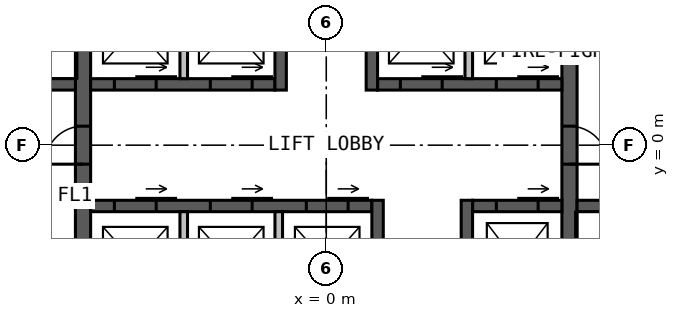
"""IFC4 building model, lengths in metres.
Left out: names, types, materials, properties, quantities, classifications, styles, units other than length and angle.
Written with IfcOpenShell. Run it as: python <this file> out.ifc"""

import sys

from ifc_helpers import new_model, si_unit, direction, frame, frame_2d, origin, place, context, subcontext, project, spatial, rectangle, extrude, element, fill, save


model = new_model("IFC4")
c1 = context("Model", 3, precision=1e-05, world=origin(), true_north=direction((0.0, 1.0)))
c2 = subcontext(c1, "Body", "Model", "MODEL_VIEW")
j1 = project(units=[si_unit("LENGTHUNIT", "METRE"), si_unit("PLANEANGLEUNIT", "RADIAN")], contexts=[c1])
p1 = place(None, origin())
s1 = spatial("IfcSite", under=j1, at=p1, CompositionType="ELEMENT")
p2 = place(p1, origin())
s2 = spatial("IfcBuilding", under=s1, at=p2, CompositionType="ELEMENT")
p3 = place(p2, frame((0.0, 0.0, 155.0)))
s3 = spatial("IfcBuildingStorey", under=s2, at=p3, CompositionType="ELEMENT", Elevation=155.0)
p4 = place(p3, frame((-6.4, -9.55, 0.0), z_axis=(0.0, 0.0, 1.0), x_axis=(0.0, 1.0, 0.0)))
e1 = element("IfcWall", 1, at=p4, inside=s3, PredefinedType="SOLIDWALL", context=c2, shape_type="SweptSolid", body=[
    extrude(rectangle(XDim=19.1, YDim=0.4, at=frame_2d((9.55, 0.0))), origin(), (0.0, 0.0, 1.0), 4.0),
])
p5 = place(p4, frame((9.05, 0.0, 0.0)))
e2 = element("IfcOpeningElement", 2, at=p5, cuts=e1, PredefinedType="OPENING", context=c2, shape_type="SweptSolid", body=[
    extrude(rectangle(XDim=1.0, YDim=2.2, at=frame_2d((0.5, 1.1))), frame((0.0, 0.21, 0.0), z_axis=(0.0, -1.0, 0.0), x_axis=(1.0, 0.0, 0.0)), (0.0, 0.0, 1.0), 0.42),
])
p6 = place(p3, frame((6.4, 9.55, 0.0), z_axis=(0.0, 0.0, 1.0), x_axis=(0.0, -1.0, 0.0)))
e3 = element("IfcWall", 3, at=p6, inside=s3, PredefinedType="SOLIDWALL", context=c2, shape_type="SweptSolid", body=[
    extrude(rectangle(XDim=19.1, YDim=0.4, at=frame_2d((9.55, 0.0))), origin(), (0.0, 0.0, 1.0), 4.0),
])
p7 = place(p6, frame((9.05, 0.0, 0.0)))
e4 = element("IfcOpeningElement", 4, at=p7, cuts=e3, PredefinedType="OPENING", context=c2, shape_type="SweptSolid", body=[
    extrude(rectangle(XDim=1.0, YDim=2.2, at=frame_2d((0.5, 1.1))), frame((0.0, 0.21, 0.0), z_axis=(0.0, -1.0, 0.0), x_axis=(1.0, 0.0, 0.0)), (0.0, 0.0, 1.0), 0.42),
])
p8 = place(p3, frame((-6.2, 1.6, 0.0), z_axis=(0.0, 0.0, 1.0), x_axis=(1.0, 0.0, 0.0)))
e5 = element("IfcWall", 5, at=p8, inside=s3, PredefinedType="SOLIDWALL", context=c2, shape_type="SweptSolid", body=[
    extrude(rectangle(XDim=4.85, YDim=0.3, at=frame_2d((2.425, 0.0))), origin(), (0.0, 0.0, 1.0), 4.0),
])
p9 = place(p8, frame((0.625, 0.0, 0.0)))
e6 = element("IfcOpeningElement", 6, at=p9, cuts=e5, PredefinedType="OPENING", context=c2, shape_type="SweptSolid", body=[
    extrude(rectangle(XDim=1.1, YDim=2.2, at=frame_2d((0.55, 1.1))), frame((0.0, 0.16, 0.0), z_axis=(0.0, -1.0, 0.0), x_axis=(1.0, 0.0, 0.0)), (0.0, 0.0, 1.0), 0.32),
])
p10 = place(p8, frame((3.15, 0.0, 0.0)))
e7 = element("IfcOpeningElement", 7, at=p10, cuts=e5, PredefinedType="OPENING", context=c2, shape_type="SweptSolid", body=[
    extrude(rectangle(XDim=1.1, YDim=2.2, at=frame_2d((0.55, 1.1))), frame((0.0, 0.16, 0.0), z_axis=(0.0, -1.0, 0.0), x_axis=(1.0, 0.0, 0.0)), (0.0, 0.0, 1.0), 0.32),
])
p11 = place(p3, frame((1.35, 1.6, 0.0), z_axis=(0.0, 0.0, 1.0), x_axis=(1.0, 0.0, 0.0)))
e8 = element("IfcWall", 8, at=p11, inside=s3, PredefinedType="SOLIDWALL", context=c2, shape_type="SweptSolid", body=[
    extrude(rectangle(XDim=4.85, YDim=0.3, at=frame_2d((2.425, 0.0))), origin(), (0.0, 0.0, 1.0), 4.0),
])
p12 = place(p11, frame((0.6, 0.0, 0.0)))
e9 = element("IfcOpeningElement", 9, at=p12, cuts=e8, PredefinedType="OPENING", context=c2, shape_type="SweptSolid", body=[
    extrude(rectangle(XDim=1.1, YDim=2.2, at=frame_2d((0.55, 1.1))), frame((0.0, 0.16, 0.0), z_axis=(0.0, -1.0, 0.0), x_axis=(1.0, 0.0, 0.0)), (0.0, 0.0, 1.0), 0.32),
])
p13 = place(p11, frame((3.125, 0.0, 0.0)))
e10 = element("IfcOpeningElement", 10, at=p13, cuts=e8, PredefinedType="OPENING", context=c2, shape_type="SweptSolid", body=[
    extrude(rectangle(XDim=1.1, YDim=2.2, at=frame_2d((0.55, 1.1))), frame((0.0, 0.16, 0.0), z_axis=(0.0, -1.0, 0.0), x_axis=(1.0, 0.0, 0.0)), (0.0, 0.0, 1.0), 0.32),
])
p14 = place(p3, frame((-1.2, 1.45, 0.0), z_axis=(0.0, 0.0, 1.0), x_axis=(0.0, 1.0, 0.0)))
e11 = element("IfcWall", 11, at=p14, inside=s3, PredefinedType="SOLIDWALL", context=c2, shape_type="SweptSolid", body=[
    extrude(rectangle(XDim=8.1, YDim=0.3, at=frame_2d((4.05, 0.0))), origin(), (0.0, 0.0, 1.0), 4.0),
])
p15 = place(p14, frame((5.05, 0.0, 0.0)))
e12 = element("IfcOpeningElement", 12, at=p15, cuts=e11, PredefinedType="OPENING", context=c2, shape_type="SweptSolid", body=[
    extrude(rectangle(XDim=1.0, YDim=2.2, at=frame_2d((0.5, 1.1))), frame((0.0, 0.16, 0.0), z_axis=(0.0, -1.0, 0.0), x_axis=(1.0, 0.0, 0.0)), (0.0, 0.0, 1.0), 0.32),
])
p16 = place(p3, frame((1.2, 1.45, 0.0), z_axis=(0.0, 0.0, 1.0), x_axis=(0.0, 1.0, 0.0)))
e13 = element("IfcWall", 13, at=p16, inside=s3, PredefinedType="SOLIDWALL", context=c2, shape_type="SweptSolid", body=[
    extrude(rectangle(XDim=8.1, YDim=0.3, at=frame_2d((4.05, 0.0))), origin(), (0.0, 0.0, 1.0), 4.0),
])
p17 = place(p16, frame((3.8, 0.0, 0.0)))
e14 = element("IfcOpeningElement", 14, at=p17, cuts=e13, PredefinedType="OPENING", context=c2, shape_type="SweptSolid", body=[
    extrude(rectangle(XDim=1.0, YDim=2.2, at=frame_2d((0.5, 1.1))), frame((0.0, 0.16, 0.0), z_axis=(0.0, -1.0, 0.0), x_axis=(1.0, 0.0, 0.0)), (0.0, 0.0, 1.0), 0.32),
])
p18 = place(p16, frame((6.15, 0.0, 0.0)))
e15 = element("IfcOpeningElement", 15, at=p18, cuts=e13, PredefinedType="OPENING", context=c2, shape_type="SweptSolid", body=[
    extrude(rectangle(XDim=1.0, YDim=2.2, at=frame_2d((0.5, 1.1))), frame((0.0, 0.16, 0.0), z_axis=(0.0, -1.0, 0.0), x_axis=(1.0, 0.0, 0.0)), (0.0, 0.0, 1.0), 0.32),
])
p19 = place(p3, frame((-6.2, -1.6, 0.0), z_axis=(0.0, 0.0, 1.0), x_axis=(1.0, 0.0, 0.0)))
e16 = element("IfcWall", 16, at=p19, inside=s3, PredefinedType="SOLIDWALL", context=c2, shape_type="SweptSolid", body=[
    extrude(rectangle(XDim=7.4, YDim=0.3, at=frame_2d((3.7, 0.0))), origin(), (0.0, 0.0, 1.0), 4.0),
])
p20 = place(p19, frame((0.625, 0.0, 0.0)))
e17 = element("IfcOpeningElement", 17, at=p20, cuts=e16, PredefinedType="OPENING", context=c2, shape_type="SweptSolid", body=[
    extrude(rectangle(XDim=1.1, YDim=2.2, at=frame_2d((0.55, 1.1))), frame((0.0, 0.16, 0.0), z_axis=(0.0, -1.0, 0.0), x_axis=(1.0, 0.0, 0.0)), (0.0, 0.0, 1.0), 0.32),
])
p21 = place(p19, frame((3.15, 0.0, 0.0)))
e18 = element("IfcOpeningElement", 18, at=p21, cuts=e16, PredefinedType="OPENING", context=c2, shape_type="SweptSolid", body=[
    extrude(rectangle(XDim=1.1, YDim=2.2, at=frame_2d((0.55, 1.1))), frame((0.0, 0.16, 0.0), z_axis=(0.0, -1.0, 0.0), x_axis=(1.0, 0.0, 0.0)), (0.0, 0.0, 1.0), 0.32),
])
p22 = place(p19, frame((5.675, 0.0, 0.0)))
e19 = element("IfcOpeningElement", 19, at=p22, cuts=e16, PredefinedType="OPENING", context=c2, shape_type="SweptSolid", body=[
    extrude(rectangle(XDim=1.1, YDim=2.2, at=frame_2d((0.55, 1.1))), frame((0.0, 0.16, 0.0), z_axis=(0.0, -1.0, 0.0), x_axis=(1.0, 0.0, 0.0)), (0.0, 0.0, 1.0), 0.32),
])
p23 = place(p3, frame((3.85, -1.6, 0.0), z_axis=(0.0, 0.0, 1.0), x_axis=(1.0, 0.0, 0.0)))
e20 = element("IfcWall", 20, at=p23, inside=s3, PredefinedType="SOLIDWALL", context=c2, shape_type="SweptSolid", body=[
    extrude(rectangle(XDim=2.35, YDim=0.3, at=frame_2d((1.175, 0.0))), origin(), (0.0, 0.0, 1.0), 4.0),
])
p24 = place(p23, frame((0.625, 0.0, 0.0)))
e21 = element("IfcOpeningElement", 21, at=p24, cuts=e20, PredefinedType="OPENING", context=c2, shape_type="SweptSolid", body=[
    extrude(rectangle(XDim=1.1, YDim=2.2, at=frame_2d((0.55, 1.1))), frame((0.0, 0.16, 0.0), z_axis=(0.0, -1.0, 0.0), x_axis=(1.0, 0.0, 0.0)), (0.0, 0.0, 1.0), 0.32),
])
p25 = place(p3, frame((1.35, -1.45, 0.0), z_axis=(0.0, 0.0, 1.0), x_axis=(0.0, -1.0, 0.0)))
e22 = element("IfcWall", 22, at=p25, inside=s3, PredefinedType="SOLIDWALL", context=c2, shape_type="SweptSolid", body=[
    extrude(rectangle(XDim=8.1, YDim=0.3, at=frame_2d((4.05, 0.0))), origin(), (0.0, 0.0, 1.0), 4.0),
])
p26 = place(p25, frame((5.975, 0.0, 0.0)))
e23 = element("IfcOpeningElement", 23, at=p26, cuts=e22, PredefinedType="OPENING", context=c2, shape_type="SweptSolid", body=[
    extrude(rectangle(XDim=1.0, YDim=2.2, at=frame_2d((0.5, 1.1))), frame((0.0, 0.16, 0.0), z_axis=(0.0, -1.0, 0.0), x_axis=(1.0, 0.0, 0.0)), (0.0, 0.0, 1.0), 0.32),
])
p27 = place(p25, frame((3.525, 0.0, 0.0)))
e24 = element("IfcOpeningElement", 24, at=p27, cuts=e22, PredefinedType="OPENING", context=c2, shape_type="SweptSolid", body=[
    extrude(rectangle(XDim=0.9, YDim=2.2, at=frame_2d((0.45, 1.1))), frame((0.0, 0.16, 0.0), z_axis=(0.0, -1.0, 0.0), x_axis=(1.0, 0.0, 0.0)), (0.0, 0.0, 1.0), 0.32),
])
p28 = place(p3, frame((3.7, -1.45, 0.0), z_axis=(0.0, 0.0, 1.0), x_axis=(0.0, -1.0, 0.0)))
e25 = element("IfcWall", 25, at=p28, inside=s3, PredefinedType="SOLIDWALL", context=c2, shape_type="SweptSolid", body=[
    extrude(rectangle(XDim=8.1, YDim=0.3, at=frame_2d((4.05, 0.0))), origin(), (0.0, 0.0, 1.0), 4.0),
])
p29 = place(p28, frame((5.1, 0.0, 0.0)))
e26 = element("IfcOpeningElement", 26, at=p29, cuts=e25, PredefinedType="OPENING", context=c2, shape_type="SweptSolid", body=[
    extrude(rectangle(XDim=0.9, YDim=2.2, at=frame_2d((0.45, 1.1))), frame((0.0, 0.16, 0.0), z_axis=(0.0, -1.0, 0.0), x_axis=(1.0, 0.0, 0.0)), (0.0, 0.0, 1.0), 0.32),
])
p30 = place(p3, frame((-9.55, 1.6, 0.0), z_axis=(0.0, 0.0, 1.0), x_axis=(1.0, 0.0, 0.0)))
e27 = element("IfcWall", 27, at=p30, inside=s3, PredefinedType="SOLIDWALL", context=c2, shape_type="SweptSolid", body=[
    extrude(rectangle(XDim=2.95, YDim=0.3, at=frame_2d((1.475, 0.0))), origin(), (0.0, 0.0, 1.0), 4.0),
])
p31 = place(p30, frame((0.975, 0.0, 0.0)))
e28 = element("IfcOpeningElement", 28, at=p31, cuts=e27, PredefinedType="OPENING", context=c2, shape_type="SweptSolid", body=[
    extrude(rectangle(XDim=1.0, YDim=2.2, at=frame_2d((0.5, 1.1))), frame((0.0, 0.16, 0.0), z_axis=(0.0, -1.0, 0.0), x_axis=(1.0, 0.0, 0.0)), (0.0, 0.0, 1.0), 0.32),
])
p32 = place(p3, frame((6.6, -1.6, 0.0), z_axis=(0.0, 0.0, 1.0), x_axis=(1.0, 0.0, 0.0)))
e29 = element("IfcWall", 29, at=p32, inside=s3, PredefinedType="SOLIDWALL", context=c2, shape_type="SweptSolid", body=[
    extrude(rectangle(XDim=2.95, YDim=0.3, at=frame_2d((1.475, 0.0))), origin(), (0.0, 0.0, 1.0), 4.0),
])
p33 = place(p32, frame((0.975, 0.0, 0.0)))
e30 = element("IfcOpeningElement", 30, at=p33, cuts=e29, PredefinedType="OPENING", context=c2, shape_type="SweptSolid", body=[
    extrude(rectangle(XDim=1.0, YDim=2.2, at=frame_2d((0.5, 1.1))), frame((0.0, 0.16, 0.0), z_axis=(0.0, -1.0, 0.0), x_axis=(1.0, 0.0, 0.0)), (0.0, 0.0, 1.0), 0.32),
])
for number, where, z_axis, x_axis in (
    (31, (-3.75, 1.75, 0.0), (0.0, 0.0, 1.0), (0.0, 1.0, 0.0)),
    (32, (3.75, 1.75, 0.0), (0.0, 0.0, 1.0), (0.0, 1.0, 0.0)),
    (33, (-3.75, -1.75, 0.0), (0.0, 0.0, 1.0), (0.0, -1.0, 0.0)),
    (34, (-1.25, -1.75, 0.0), (0.0, 0.0, 1.0), (0.0, -1.0, 0.0)),
):
    element("IfcWall", number, at=place(p3, frame(where, z_axis=z_axis, x_axis=x_axis)), inside=s3, PredefinedType="SOLIDWALL", context=c2, shape_type="SweptSolid", body=[
        extrude(rectangle(XDim=2.7, YDim=0.2, at=frame_2d((1.35, 0.0))), origin(), (0.0, 0.0, 1.0), 3.75),
    ])
p34 = place(p5, origin())
e35 = element("IfcDoor", 35, at=p34, inside=s3, OperationType="SINGLE_SWING_LEFT", PredefinedType="DOOR", context=c2, shape_type="SweptSolid", body=[
    extrude(rectangle(XDim=1.0, YDim=2.2, at=frame_2d((0.5, 1.1))), frame((0.0, 0.025, 0.0), z_axis=(0.0, -1.0, 0.0), x_axis=(1.0, 0.0, 0.0)), (0.0, 0.0, 1.0), 0.05),
])
fill(e2, e35)
p35 = place(p7, origin())
e36 = element("IfcDoor", 36, at=p35, inside=s3, OperationType="SINGLE_SWING_RIGHT", PredefinedType="DOOR", context=c2, shape_type="SweptSolid", body=[
    extrude(rectangle(XDim=1.0, YDim=2.2, at=frame_2d((0.5, 1.1))), frame((0.0, 0.025, 0.0), z_axis=(0.0, -1.0, 0.0), x_axis=(1.0, 0.0, 0.0)), (0.0, 0.0, 1.0), 0.05),
])
fill(e4, e36)
p36 = place(p9, origin())
e37 = element("IfcDoor", 37, at=p36, inside=s3, OperationType="SLIDING_TO_LEFT", PredefinedType="DOOR", context=c2, shape_type="SweptSolid", body=[
    extrude(rectangle(XDim=1.1, YDim=2.2, at=frame_2d((0.55, 1.1))), frame((0.0, 0.025, 0.0), z_axis=(0.0, -1.0, 0.0), x_axis=(1.0, 0.0, 0.0)), (0.0, 0.0, 1.0), 0.05),
])
fill(e6, e37)
p37 = place(p10, origin())
e38 = element("IfcDoor", 38, at=p37, inside=s3, OperationType="SLIDING_TO_LEFT", PredefinedType="DOOR", context=c2, shape_type="SweptSolid", body=[
    extrude(rectangle(XDim=1.1, YDim=2.2, at=frame_2d((0.55, 1.1))), frame((0.0, 0.025, 0.0), z_axis=(0.0, -1.0, 0.0), x_axis=(1.0, 0.0, 0.0)), (0.0, 0.0, 1.0), 0.05),
])
fill(e7, e38)
p38 = place(p12, origin())
e39 = element("IfcDoor", 39, at=p38, inside=s3, OperationType="SLIDING_TO_LEFT", PredefinedType="DOOR", context=c2, shape_type="SweptSolid", body=[
    extrude(rectangle(XDim=1.1, YDim=2.2, at=frame_2d((0.55, 1.1))), frame((0.0, 0.025, 0.0), z_axis=(0.0, -1.0, 0.0), x_axis=(1.0, 0.0, 0.0)), (0.0, 0.0, 1.0), 0.05),
])
fill(e9, e39)
p39 = place(p13, origin())
e40 = element("IfcDoor", 40, at=p39, inside=s3, OperationType="SLIDING_TO_LEFT", PredefinedType="DOOR", context=c2, shape_type="SweptSolid", body=[
    extrude(rectangle(XDim=1.1, YDim=2.2, at=frame_2d((0.55, 1.1))), frame((0.0, 0.025, 0.0), z_axis=(0.0, -1.0, 0.0), x_axis=(1.0, 0.0, 0.0)), (0.0, 0.0, 1.0), 0.05),
])
fill(e10, e40)
p40 = place(p20, origin())
e41 = element("IfcDoor", 41, at=p40, inside=s3, OperationType="SLIDING_TO_LEFT", PredefinedType="DOOR", context=c2, shape_type="SweptSolid", body=[
    extrude(rectangle(XDim=1.1, YDim=2.2, at=frame_2d((0.55, 1.1))), frame((0.0, 0.025, 0.0), z_axis=(0.0, -1.0, 0.0), x_axis=(1.0, 0.0, 0.0)), (0.0, 0.0, 1.0), 0.05),
])
fill(e17, e41)
p41 = place(p21, origin())
e42 = element("IfcDoor", 42, at=p41, inside=s3, OperationType="SLIDING_TO_LEFT", PredefinedType="DOOR", context=c2, shape_type="SweptSolid", body=[
    extrude(rectangle(XDim=1.1, YDim=2.2, at=frame_2d((0.55, 1.1))), frame((0.0, 0.025, 0.0), z_axis=(0.0, -1.0, 0.0), x_axis=(1.0, 0.0, 0.0)), (0.0, 0.0, 1.0), 0.05),
])
fill(e18, e42)
p42 = place(p22, origin())
e43 = element("IfcDoor", 43, at=p42, inside=s3, OperationType="SLIDING_TO_LEFT", PredefinedType="DOOR", context=c2, shape_type="SweptSolid", body=[
    extrude(rectangle(XDim=1.1, YDim=2.2, at=frame_2d((0.55, 1.1))), frame((0.0, 0.025, 0.0), z_axis=(0.0, -1.0, 0.0), x_axis=(1.0, 0.0, 0.0)), (0.0, 0.0, 1.0), 0.05),
])
fill(e19, e43)
p43 = place(p24, origin())
e44 = element("IfcDoor", 44, at=p43, inside=s3, OperationType="SLIDING_TO_LEFT", PredefinedType="DOOR", context=c2, shape_type="SweptSolid", body=[
    extrude(rectangle(XDim=1.1, YDim=2.2, at=frame_2d((0.55, 1.1))), frame((0.0, 0.025, 0.0), z_axis=(0.0, -1.0, 0.0), x_axis=(1.0, 0.0, 0.0)), (0.0, 0.0, 1.0), 0.05),
])
fill(e21, e44)
save(model, sys.argv[1])
